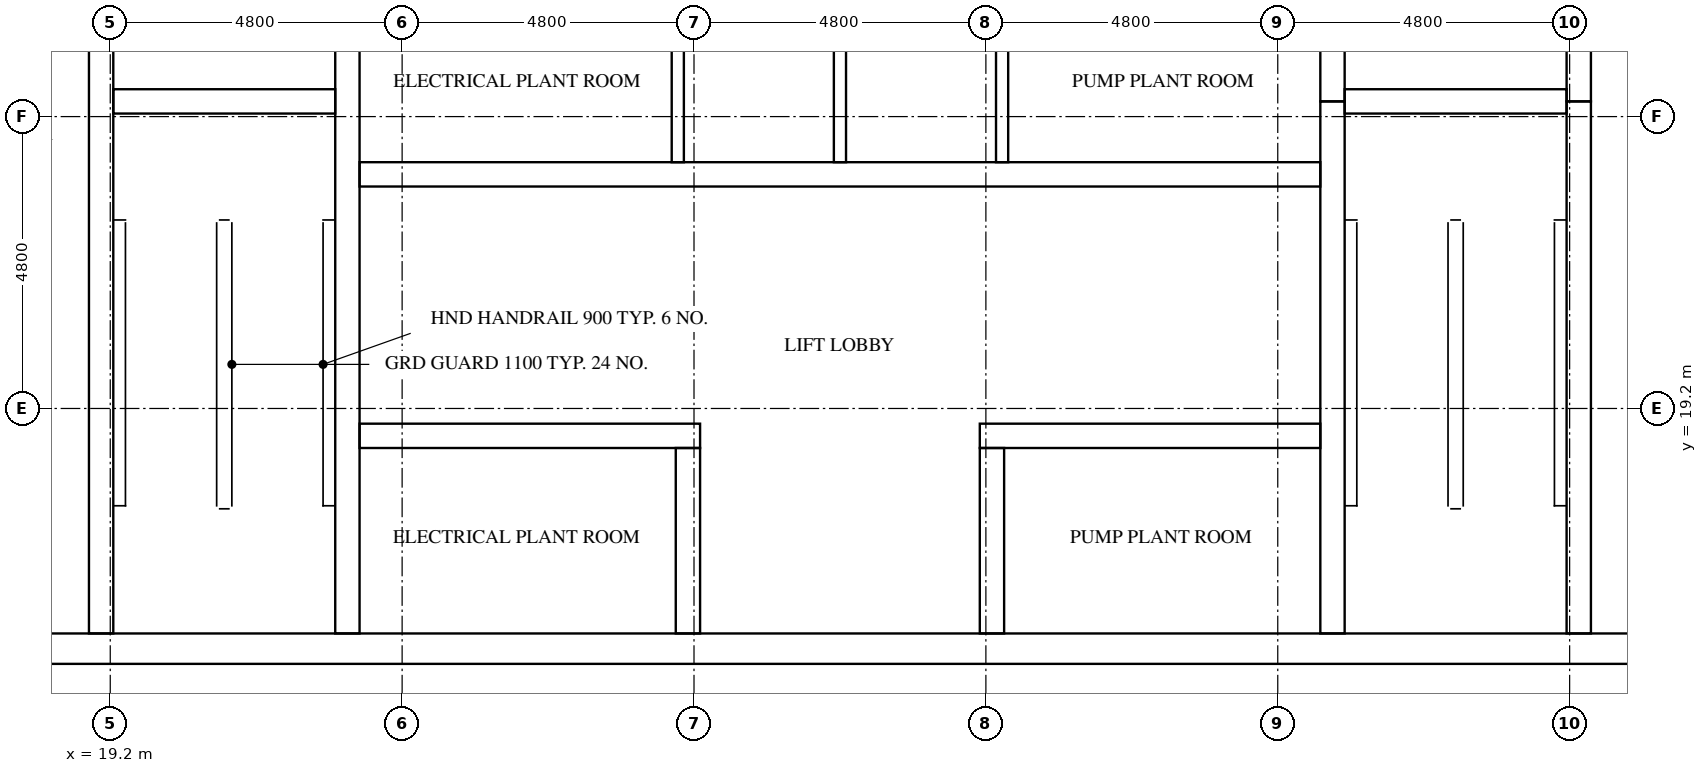
"""IFC4 building model, lengths in metres.
Left out: names, types, materials, properties, quantities, classifications, styles, units other than length and angle.
Written with IfcOpenShell. Run it as: python <this file> out.ifc"""

import sys

from ifc_helpers import new_model, si_unit, direction, frame, frame_2d, origin, place, context, subcontext, project, spatial, rectangle, extrude, element, fill, save


model = new_model("IFC4")
c1 = context("Model", 3, precision=1e-05, world=origin(), true_north=direction((0.0, 1.0)))
c2 = subcontext(c1, "Body", "Model", "MODEL_VIEW")
j1 = project(units=[si_unit("LENGTHUNIT", "METRE"), si_unit("PLANEANGLEUNIT", "RADIAN")], contexts=[c1])
p1 = place(None, origin())
s1 = spatial("IfcSite", under=j1, at=p1, CompositionType="ELEMENT")
p2 = place(p1, origin())
s2 = spatial("IfcBuilding", under=s1, at=p2, CompositionType="ELEMENT")
p3 = place(p2, frame((0.0, 0.0, 286.1)))
s3 = spatial("IfcBuildingStorey", under=s2, at=p3, CompositionType="ELEMENT", Elevation=286.1)
p4 = place(p3, frame((15.0, 15.25, 0.0), z_axis=(0.0, 0.0, 1.0), x_axis=(1.0, 0.0, 0.0)))
e1 = element("IfcWall", 1, at=p4, inside=s3, PredefinedType="SHEAR", context=c2, shape_type="SweptSolid", body=[
    extrude(rectangle(XDim=32.4, YDim=0.5, at=frame_2d((16.2, 0.0))), origin(), (0.0, 0.0, 1.0), 5.1),
])
p5 = place(p4, frame((15.3, 0.0, 0.0)))
e2 = element("IfcOpeningElement", 2, at=p5, cuts=e1, PredefinedType="OPENING", context=c2, shape_type="SweptSolid", body=[
    extrude(rectangle(XDim=1.8, YDim=2.1, at=frame_2d((0.9, 1.05))), frame((0.0, 0.26, 0.0), z_axis=(0.0, -1.0, 0.0), x_axis=(1.0, 0.0, 0.0)), (0.0, 0.0, 1.0), 0.52),
])
p6 = place(p3, frame((19.05, 15.5, 0.0), z_axis=(0.0, 0.0, 1.0), x_axis=(0.0, 1.0, 0.0)))
e3 = element("IfcWall", 3, at=p6, inside=s3, PredefinedType="SHEAR", context=c2, shape_type="SweptSolid", body=[
    extrude(rectangle(XDim=15.55, YDim=0.4, at=frame_2d((7.775, 0.0))), origin(), (0.0, 0.0, 1.0), 5.1),
])
p7 = place(p6, frame((9.95, 0.0, 0.0)))
e4 = element("IfcOpeningElement", 4, at=p7, cuts=e3, PredefinedType="OPENING", context=c2, shape_type="SweptSolid", body=[
    extrude(rectangle(XDim=1.1, YDim=2.1, at=frame_2d((0.55, 1.05))), frame((0.0, 0.21, 0.0), z_axis=(0.0, -1.0, 0.0), x_axis=(1.0, 0.0, 0.0)), (0.0, 0.0, 1.0), 0.42),
])
p8 = place(p6, frame((13.45, 0.0, 0.0)))
e5 = element("IfcOpeningElement", 5, at=p8, cuts=e3, PredefinedType="OPENING", context=c2, shape_type="SweptSolid", body=[
    extrude(rectangle(XDim=1.1, YDim=2.1, at=frame_2d((0.55, 1.05))), frame((0.0, 0.21, 0.0), z_axis=(0.0, -1.0, 0.0), x_axis=(1.0, 0.0, 0.0)), (0.0, 0.0, 1.0), 0.42),
])
p9 = place(p6, frame((0.7, 0.0, 0.0)))
e6 = element("IfcOpeningElement", 6, at=p9, cuts=e3, PredefinedType="OPENING", context=c2, shape_type="SweptSolid", body=[
    extrude(rectangle(XDim=1.2, YDim=2.1, at=frame_2d((0.6, 1.05))), frame((0.0, 0.21, 0.0), z_axis=(0.0, -1.0, 0.0), x_axis=(1.0, 0.0, 0.0)), (0.0, 0.0, 1.0), 0.42),
])
p10 = place(p3, frame((23.1, 15.5, 0.0), z_axis=(0.0, 0.0, 1.0), x_axis=(0.0, 1.0, 0.0)))
e7 = element("IfcWall", 7, at=p10, inside=s3, PredefinedType="SHEAR", context=c2, shape_type="SweptSolid", body=[
    extrude(rectangle(XDim=21.8, YDim=0.4, at=frame_2d((10.9, 0.0))), origin(), (0.0, 0.0, 1.0), 5.1),
])
p11 = place(p3, frame((39.3, 15.5, 0.0), z_axis=(0.0, 0.0, 1.0), x_axis=(0.0, 1.0, 0.0)))
e8 = element("IfcWall", 8, at=p11, inside=s3, PredefinedType="SHEAR", context=c2, shape_type="SweptSolid", body=[
    extrude(rectangle(XDim=8.75, YDim=0.4, at=frame_2d((4.375, 0.0))), origin(), (0.0, 0.0, 1.0), 5.1),
])
p12 = place(p3, frame((39.3, 24.25, 0.0), z_axis=(0.0, 0.0, 1.0), x_axis=(0.0, 1.0, 0.0)))
e9 = element("IfcWall", 9, at=p12, inside=s3, PredefinedType="SHEAR", context=c2, shape_type="SweptSolid", body=[
    extrude(rectangle(XDim=3.5, YDim=0.4, at=frame_2d((1.75, 0.0))), origin(), (0.0, 0.0, 1.0), 5.1),
])
p13 = place(p3, frame((43.35, 15.5, 0.0), z_axis=(0.0, 0.0, 1.0), x_axis=(0.0, 1.0, 0.0)))
e10 = element("IfcWall", 10, at=p13, inside=s3, PredefinedType="SHEAR", context=c2, shape_type="SweptSolid", body=[
    extrude(rectangle(XDim=8.75, YDim=0.4, at=frame_2d((4.375, 0.0))), origin(), (0.0, 0.0, 1.0), 5.1),
])
p14 = place(p13, frame((0.7, 0.0, 0.0)))
e11 = element("IfcOpeningElement", 11, at=p14, cuts=e10, PredefinedType="OPENING", context=c2, shape_type="SweptSolid", body=[
    extrude(rectangle(XDim=1.2, YDim=2.1, at=frame_2d((0.6, 1.05))), frame((0.0, 0.21, 0.0), z_axis=(0.0, -1.0, 0.0), x_axis=(1.0, 0.0, 0.0)), (0.0, 0.0, 1.0), 0.42),
])
p15 = place(p3, frame((43.35, 24.25, 0.0), z_axis=(0.0, 0.0, 1.0), x_axis=(0.0, 1.0, 0.0)))
e12 = element("IfcWall", 12, at=p15, inside=s3, PredefinedType="SHEAR", context=c2, shape_type="SweptSolid", body=[
    extrude(rectangle(XDim=3.5, YDim=0.4, at=frame_2d((1.75, 0.0))), origin(), (0.0, 0.0, 1.0), 5.1),
])
p16 = place(p15, frame((1.2, 0.0, 0.0)))
e13 = element("IfcOpeningElement", 13, at=p16, cuts=e12, PredefinedType="OPENING", context=c2, shape_type="SweptSolid", body=[
    extrude(rectangle(XDim=1.1, YDim=2.1, at=frame_2d((0.55, 1.05))), frame((0.0, 0.21, 0.0), z_axis=(0.0, -1.0, 0.0), x_axis=(1.0, 0.0, 0.0)), (0.0, 0.0, 1.0), 0.42),
])
for number, where, z_axis, x_axis in (
    (14, (19.25, 24.25, 0.0), (0.0, 0.0, 1.0), (1.0, 0.0, 0.0)),
    (15, (39.5, 24.25, 0.0), (0.0, 0.0, 1.0), (1.0, 0.0, 0.0)),
):
    element("IfcWall", number, at=place(p3, frame(where, z_axis=z_axis, x_axis=x_axis)), inside=s3, PredefinedType="SHEAR", context=c2, shape_type="SweptSolid", body=[
        extrude(rectangle(XDim=3.65, YDim=0.4, at=frame_2d((1.825, 0.0))), origin(), (0.0, 0.0, 1.0), 5.1),
    ])
p17 = place(p3, frame((23.3, 18.75, 0.0), z_axis=(0.0, 0.0, 1.0), x_axis=(1.0, 0.0, 0.0)))
e16 = element("IfcWall", 16, at=p17, inside=s3, PredefinedType="SHEAR", context=c2, shape_type="SweptSolid", body=[
    extrude(rectangle(XDim=5.6, YDim=0.4, at=frame_2d((2.8, 0.0))), origin(), (0.0, 0.0, 1.0), 5.1),
])
p18 = place(p17, frame((2.1, 0.0, 0.0)))
e17 = element("IfcOpeningElement", 17, at=p18, cuts=e16, PredefinedType="OPENING", context=c2, shape_type="SweptSolid", body=[
    extrude(rectangle(XDim=1.0, YDim=2.1, at=frame_2d((0.5, 1.05))), frame((0.0, 0.21, 0.0), z_axis=(0.0, -1.0, 0.0), x_axis=(1.0, 0.0, 0.0)), (0.0, 0.0, 1.0), 0.42),
])
p19 = place(p3, frame((33.5, 18.75, 0.0), z_axis=(0.0, 0.0, 1.0), x_axis=(1.0, 0.0, 0.0)))
e18 = element("IfcWall", 18, at=p19, inside=s3, PredefinedType="SHEAR", context=c2, shape_type="SweptSolid", body=[
    extrude(rectangle(XDim=5.6, YDim=0.4, at=frame_2d((2.8, 0.0))), origin(), (0.0, 0.0, 1.0), 5.1),
])
p20 = place(p19, frame((2.5, 0.0, 0.0)))
e19 = element("IfcOpeningElement", 19, at=p20, cuts=e18, PredefinedType="OPENING", context=c2, shape_type="SweptSolid", body=[
    extrude(rectangle(XDim=1.0, YDim=2.1, at=frame_2d((0.5, 1.05))), frame((0.0, 0.21, 0.0), z_axis=(0.0, -1.0, 0.0), x_axis=(1.0, 0.0, 0.0)), (0.0, 0.0, 1.0), 0.42),
])
p21 = place(p3, frame((23.3, 23.05, 0.0), z_axis=(0.0, 0.0, 1.0), x_axis=(1.0, 0.0, 0.0)))
e20 = element("IfcWall", 20, at=p21, inside=s3, PredefinedType="SHEAR", context=c2, shape_type="SweptSolid", body=[
    extrude(rectangle(XDim=15.8, YDim=0.4, at=frame_2d((7.9, 0.0))), origin(), (0.0, 0.0, 1.0), 5.1),
])
p22 = place(p21, frame((6.017, 0.0, 0.0)))
e21 = element("IfcOpeningElement", 21, at=p22, cuts=e20, PredefinedType="OPENING", context=c2, shape_type="SweptSolid", body=[
    extrude(rectangle(XDim=1.1, YDim=2.1, at=frame_2d((0.55, 1.05))), frame((0.0, 0.21, 0.0), z_axis=(0.0, -1.0, 0.0), x_axis=(1.0, 0.0, 0.0)), (0.0, 0.0, 1.0), 0.42),
])
p23 = place(p21, frame((8.683, 0.0, 0.0)))
e22 = element("IfcOpeningElement", 22, at=p23, cuts=e20, PredefinedType="OPENING", context=c2, shape_type="SweptSolid", body=[
    extrude(rectangle(XDim=1.1, YDim=2.1, at=frame_2d((0.55, 1.05))), frame((0.0, 0.21, 0.0), z_axis=(0.0, -1.0, 0.0), x_axis=(1.0, 0.0, 0.0)), (0.0, 0.0, 1.0), 0.42),
])
p24 = place(p21, frame((2.067, 0.0, 0.0)))
e23 = element("IfcOpeningElement", 23, at=p24, cuts=e20, PredefinedType="OPENING", context=c2, shape_type="SweptSolid", body=[
    extrude(rectangle(XDim=1.0, YDim=2.1, at=frame_2d((0.5, 1.05))), frame((0.0, 0.21, 0.0), z_axis=(0.0, -1.0, 0.0), x_axis=(1.0, 0.0, 0.0)), (0.0, 0.0, 1.0), 0.42),
])
p25 = place(p21, frame((12.733, 0.0, 0.0)))
e24 = element("IfcOpeningElement", 24, at=p25, cuts=e20, PredefinedType="OPENING", context=c2, shape_type="SweptSolid", body=[
    extrude(rectangle(XDim=1.0, YDim=2.1, at=frame_2d((0.5, 1.05))), frame((0.0, 0.21, 0.0), z_axis=(0.0, -1.0, 0.0), x_axis=(1.0, 0.0, 0.0)), (0.0, 0.0, 1.0), 0.42),
])
for number, where, z_axis, x_axis in (
    (25, (28.7, 15.5, 0.0), (0.0, 0.0, 1.0), (0.0, 1.0, 0.0)),
    (26, (33.7, 15.5, 0.0), (0.0, 0.0, 1.0), (0.0, 1.0, 0.0)),
):
    element("IfcWall", number, at=place(p3, frame(where, z_axis=z_axis, x_axis=x_axis)), inside=s3, PredefinedType="SHEAR", context=c2, shape_type="SweptSolid", body=[
        extrude(rectangle(XDim=3.05, YDim=0.4, at=frame_2d((1.525, 0.0))), origin(), (0.0, 0.0, 1.0), 5.1),
    ])
for number, where, z_axis, x_axis in (
    (27, (28.533, 23.25, 0.0), (0.0, 0.0, 1.0), (0.0, 1.0, 0.0)),
    (28, (31.2, 23.25, 0.0), (0.0, 0.0, 1.0), (0.0, 1.0, 0.0)),
    (29, (33.867, 23.25, 0.0), (0.0, 0.0, 1.0), (0.0, 1.0, 0.0)),
):
    element("IfcWall", number, at=place(p3, frame(where, z_axis=z_axis, x_axis=x_axis)), inside=s3, PredefinedType="SOLIDWALL", context=c2, shape_type="SweptSolid", body=[
        extrude(rectangle(XDim=2.7, YDim=0.2, at=frame_2d((1.35, 0.0))), origin(), (0.0, 0.0, 1.0), 5.1),
    ])
p26 = place(p22, origin())
e30 = element("IfcDoor", 30, at=p26, inside=s3, OperationType="DOUBLE_DOOR_SLIDING", PredefinedType="DOOR", context=c2, shape_type="SweptSolid", body=[
    extrude(rectangle(XDim=1.1, YDim=2.1, at=frame_2d((0.55, 1.05))), frame((0.0, 0.025, 0.0), z_axis=(0.0, -1.0, 0.0), x_axis=(1.0, 0.0, 0.0)), (0.0, 0.0, 1.0), 0.05),
])
fill(e21, e30)
p27 = place(p23, origin())
e31 = element("IfcDoor", 31, at=p27, inside=s3, OperationType="DOUBLE_DOOR_SLIDING", PredefinedType="DOOR", context=c2, shape_type="SweptSolid", body=[
    extrude(rectangle(XDim=1.1, YDim=2.1, at=frame_2d((0.55, 1.05))), frame((0.0, 0.025, 0.0), z_axis=(0.0, -1.0, 0.0), x_axis=(1.0, 0.0, 0.0)), (0.0, 0.0, 1.0), 0.05),
])
fill(e22, e31)
p28 = place(p9, frame((1.2, 0.0, 0.0), z_axis=(0.0, 0.0, 1.0), x_axis=(-1.0, 0.0, 0.0)))
e32 = element("IfcDoor", 32, at=p28, inside=s3, OperationType="SINGLE_SWING_LEFT", PredefinedType="DOOR", context=c2, shape_type="SweptSolid", body=[
    extrude(rectangle(XDim=1.2, YDim=2.1, at=frame_2d((0.6, 1.05))), frame((0.0, 0.025, 0.0), z_axis=(0.0, -1.0, 0.0), x_axis=(1.0, 0.0, 0.0)), (0.0, 0.0, 1.0), 0.05),
])
fill(e6, e32)
p29 = place(p14, origin())
e33 = element("IfcDoor", 33, at=p29, inside=s3, OperationType="SINGLE_SWING_RIGHT", PredefinedType="DOOR", context=c2, shape_type="SweptSolid", body=[
    extrude(rectangle(XDim=1.2, YDim=2.1, at=frame_2d((0.6, 1.05))), frame((0.0, 0.025, 0.0), z_axis=(0.0, -1.0, 0.0), x_axis=(1.0, 0.0, 0.0)), (0.0, 0.0, 1.0), 0.05),
])
fill(e11, e33)
p30 = place(p5, frame((1.8, 0.0, 0.0), z_axis=(0.0, 0.0, 1.0), x_axis=(-1.0, 0.0, 0.0)))
e34 = element("IfcDoor", 34, at=p30, inside=s3, OperationType="DOUBLE_DOOR_SINGLE_SWING", PredefinedType="DOOR", context=c2, shape_type="SweptSolid", body=[
    extrude(rectangle(XDim=1.8, YDim=2.1, at=frame_2d((0.9, 1.05))), frame((0.0, 0.025, 0.0), z_axis=(0.0, -1.0, 0.0), x_axis=(1.0, 0.0, 0.0)), (0.0, 0.0, 1.0), 0.05),
])
fill(e2, e34)
p31 = place(p24, frame((1.0, 0.0, 0.0), z_axis=(0.0, 0.0, 1.0), x_axis=(-1.0, 0.0, 0.0)))
e35 = element("IfcDoor", 35, at=p31, inside=s3, OperationType="SINGLE_SWING_RIGHT", PredefinedType="DOOR", context=c2, shape_type="SweptSolid", body=[
    extrude(rectangle(XDim=1.0, YDim=2.1, at=frame_2d((0.5, 1.05))), frame((0.0, 0.025, 0.0), z_axis=(0.0, -1.0, 0.0), x_axis=(1.0, 0.0, 0.0)), (0.0, 0.0, 1.0), 0.05),
])
fill(e23, e35)
p32 = place(p25, frame((1.0, 0.0, 0.0), z_axis=(0.0, 0.0, 1.0), x_axis=(-1.0, 0.0, 0.0)))
e36 = element("IfcDoor", 36, at=p32, inside=s3, OperationType="SINGLE_SWING_LEFT", PredefinedType="DOOR", context=c2, shape_type="SweptSolid", body=[
    extrude(rectangle(XDim=1.0, YDim=2.1, at=frame_2d((0.5, 1.05))), frame((0.0, 0.025, 0.0), z_axis=(0.0, -1.0, 0.0), x_axis=(1.0, 0.0, 0.0)), (0.0, 0.0, 1.0), 0.05),
])
fill(e24, e36)
p33 = place(p18, origin())
e37 = element("IfcDoor", 37, at=p33, inside=s3, OperationType="SINGLE_SWING_RIGHT", PredefinedType="DOOR", context=c2, shape_type="SweptSolid", body=[
    extrude(rectangle(XDim=1.0, YDim=2.1, at=frame_2d((0.5, 1.05))), frame((0.0, 0.025, 0.0), z_axis=(0.0, -1.0, 0.0), x_axis=(1.0, 0.0, 0.0)), (0.0, 0.0, 1.0), 0.05),
])
fill(e17, e37)
p34 = place(p20, origin())
e38 = element("IfcDoor", 38, at=p34, inside=s3, OperationType="SINGLE_SWING_LEFT", PredefinedType="DOOR", context=c2, shape_type="SweptSolid", body=[
    extrude(rectangle(XDim=1.0, YDim=2.1, at=frame_2d((0.5, 1.05))), frame((0.0, 0.025, 0.0), z_axis=(0.0, -1.0, 0.0), x_axis=(1.0, 0.0, 0.0)), (0.0, 0.0, 1.0), 0.05),
])
fill(e19, e38)
save(model, sys.argv[1])
